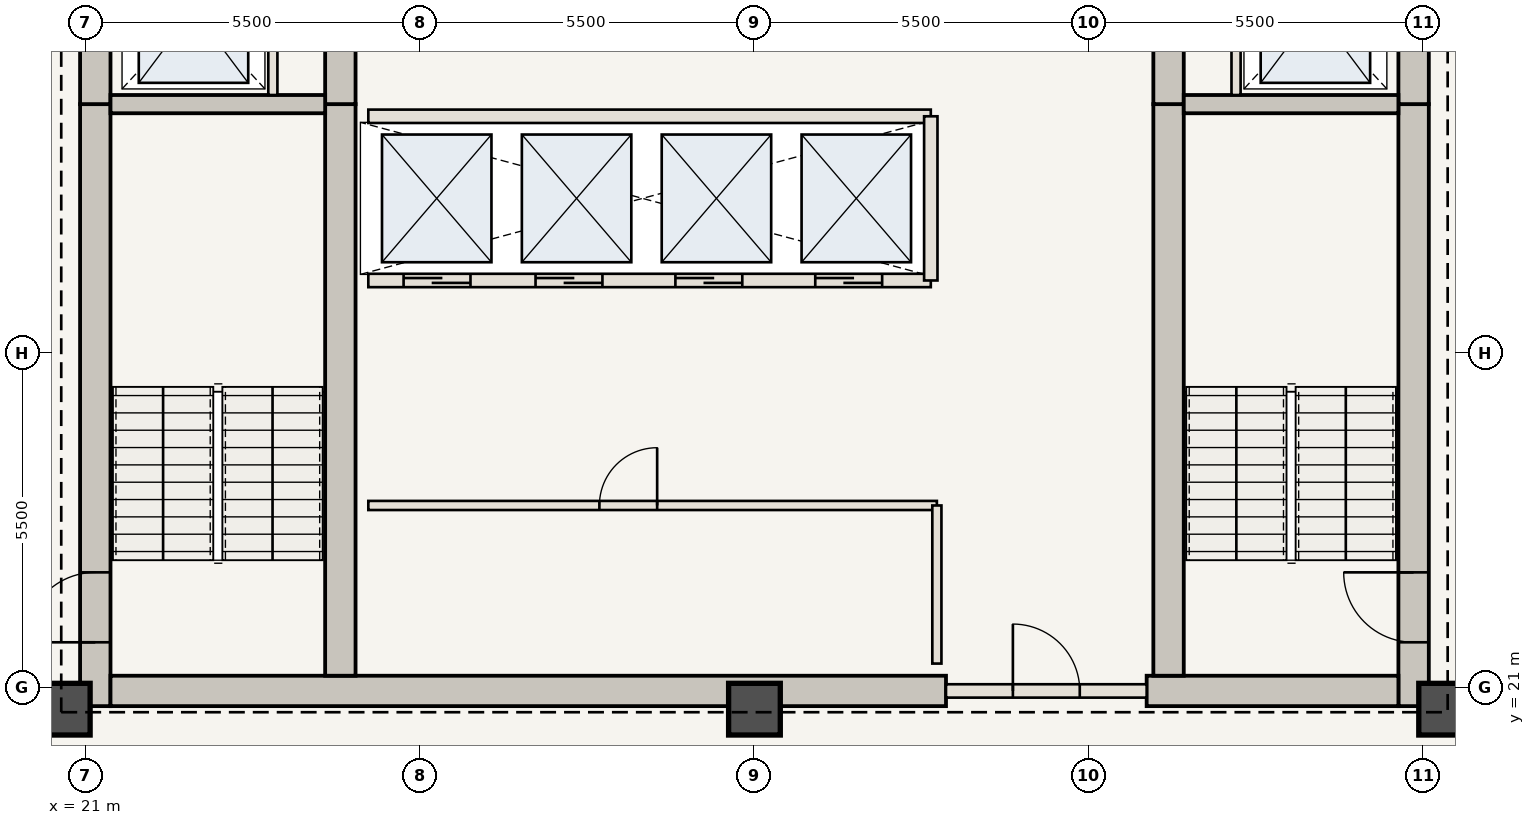
"""IFC4 building model, lengths in metres.
Left out: names, types, materials, properties, quantities, classifications, styles, units other than length and angle.
Written with IfcOpenShell. Run it as: python <this file> out.ifc"""

import sys

from ifc_helpers import new_model, si_unit, direction, frame, frame_2d, origin, origin_2d, place, context, subcontext, project, spatial, rectangle, extrude, element, fill, save


model = new_model("IFC4")
c1 = context("Model", 3, precision=1e-05, world=origin(), true_north=direction((0.0, 1.0)))
c2 = subcontext(c1, "Body", "Model", "MODEL_VIEW")
j1 = project(units=[si_unit("LENGTHUNIT", "METRE"), si_unit("PLANEANGLEUNIT", "RADIAN")], contexts=[c1])
p1 = place(None, origin())
s1 = spatial("IfcSite", under=j1, at=p1, CompositionType="ELEMENT")
p2 = place(p1, origin())
s2 = spatial("IfcBuilding", under=s1, at=p2, CompositionType="ELEMENT")
p3 = place(p2, frame((0.0, 0.0, 248.5)))
s3 = spatial("IfcBuildingStorey", under=s2, at=p3, CompositionType="ELEMENT", Elevation=248.5)
p4 = place(p3, frame((21.16, 20.7, 0.0), z_axis=(0.0, 0.0, 1.0), x_axis=(0.0, 1.0, 0.0)))
e1 = element("IfcWall", 1, at=p4, inside=s3, PredefinedType="SHEAR", context=c2, shape_type="SweptSolid", body=[
    extrude(rectangle(XDim=9.9, YDim=0.5, at=frame_2d((4.95, 0.0))), origin(), (0.0, 0.0, 1.0), 3.85),
])
p5 = place(p4, frame((1.05, 0.0, 0.0)))
e2 = element("IfcOpeningElement", 2, at=p5, cuts=e1, PredefinedType="OPENING", context=c2, shape_type="SweptSolid", body=[
    extrude(rectangle(XDim=1.15, YDim=2.15, at=frame_2d((0.575, 1.075))), frame((0.0, 0.26, 0.0), z_axis=(0.0, -1.0, 0.0), x_axis=(1.0, 0.0, 0.0)), (0.0, 0.0, 1.0), 0.52),
])
p6 = place(p3, frame((21.16, 30.6, 0.0), z_axis=(0.0, 0.0, 1.0), x_axis=(0.0, 1.0, 0.0)))
e3 = element("IfcWall", 3, at=p6, inside=s3, PredefinedType="SHEAR", context=c2, shape_type="SweptSolid", body=[
    extrude(rectangle(XDim=12.65, YDim=0.5, at=frame_2d((6.325, 0.0))), origin(), (0.0, 0.0, 1.0), 3.85),
])
p7 = place(p6, frame((4.2, 0.0, 0.0)))
e4 = element("IfcOpeningElement", 4, at=p7, cuts=e3, PredefinedType="OPENING", context=c2, shape_type="SweptSolid", body=[
    extrude(rectangle(XDim=1.1, YDim=2.15, at=frame_2d((0.55, 1.075))), frame((0.0, 0.26, 0.0), z_axis=(0.0, -1.0, 0.0), x_axis=(1.0, 0.0, 0.0)), (0.0, 0.0, 1.0), 0.52),
])
p8 = place(p6, frame((9.2, 0.0, 0.0)))
e5 = element("IfcOpeningElement", 5, at=p8, cuts=e3, PredefinedType="OPENING", context=c2, shape_type="SweptSolid", body=[
    extrude(rectangle(XDim=0.92, YDim=2.1, at=frame_2d((0.46, 1.05))), frame((0.0, 0.26, 0.0), z_axis=(0.0, -1.0, 0.0), x_axis=(1.0, 0.0, 0.0)), (0.0, 0.0, 1.0), 0.52),
])
p9 = place(p3, frame((42.84, 20.7, 0.0), z_axis=(0.0, 0.0, 1.0), x_axis=(0.0, 1.0, 0.0)))
e6 = element("IfcWall", 6, at=p9, inside=s3, PredefinedType="SHEAR", context=c2, shape_type="SweptSolid", body=[
    extrude(rectangle(XDim=9.9, YDim=0.5, at=frame_2d((4.95, 0.0))), origin(), (0.0, 0.0, 1.0), 3.85),
])
p10 = place(p9, frame((1.05, 0.0, 0.0)))
e7 = element("IfcOpeningElement", 7, at=p10, cuts=e6, PredefinedType="OPENING", context=c2, shape_type="SweptSolid", body=[
    extrude(rectangle(XDim=1.15, YDim=2.15, at=frame_2d((0.575, 1.075))), frame((0.0, 0.26, 0.0), z_axis=(0.0, -1.0, 0.0), x_axis=(1.0, 0.0, 0.0)), (0.0, 0.0, 1.0), 0.52),
])
p11 = place(p3, frame((42.84, 30.6, 0.0), z_axis=(0.0, 0.0, 1.0), x_axis=(0.0, 1.0, 0.0)))
e8 = element("IfcWall", 8, at=p11, inside=s3, PredefinedType="SHEAR", context=c2, shape_type="SweptSolid", body=[
    extrude(rectangle(XDim=12.65, YDim=0.5, at=frame_2d((6.325, 0.0))), origin(), (0.0, 0.0, 1.0), 3.85),
])
p12 = place(p11, frame((4.2, 0.0, 0.0)))
e9 = element("IfcOpeningElement", 9, at=p12, cuts=e8, PredefinedType="OPENING", context=c2, shape_type="SweptSolid", body=[
    extrude(rectangle(XDim=1.1, YDim=2.15, at=frame_2d((0.55, 1.075))), frame((0.0, 0.26, 0.0), z_axis=(0.0, -1.0, 0.0), x_axis=(1.0, 0.0, 0.0)), (0.0, 0.0, 1.0), 0.52),
])
p13 = place(p11, frame((8.05, 0.0, 0.0)))
e10 = element("IfcOpeningElement", 10, at=p13, cuts=e8, PredefinedType="OPENING", context=c2, shape_type="SweptSolid", body=[
    extrude(rectangle(XDim=0.88, YDim=2.1, at=frame_2d((0.44, 1.05))), frame((0.0, 0.26, 0.0), z_axis=(0.0, -1.0, 0.0), x_axis=(1.0, 0.0, 0.0)), (0.0, 0.0, 1.0), 0.52),
])
p14 = place(p11, frame((9.45, 0.0, 0.0)))
e11 = element("IfcOpeningElement", 11, at=p14, cuts=e8, PredefinedType="OPENING", context=c2, shape_type="SweptSolid", body=[
    extrude(rectangle(XDim=0.88, YDim=2.1, at=frame_2d((0.44, 1.05))), frame((0.0, 0.26, 0.0), z_axis=(0.0, -1.0, 0.0), x_axis=(1.0, 0.0, 0.0)), (0.0, 0.0, 1.0), 0.52),
])
p15 = place(p11, frame((10.85, 0.0, 0.0)))
e12 = element("IfcOpeningElement", 12, at=p15, cuts=e8, PredefinedType="OPENING", context=c2, shape_type="SweptSolid", body=[
    extrude(rectangle(XDim=0.88, YDim=2.1, at=frame_2d((0.44, 1.05))), frame((0.0, 0.26, 0.0), z_axis=(0.0, -1.0, 0.0), x_axis=(1.0, 0.0, 0.0)), (0.0, 0.0, 1.0), 0.52),
])
p16 = place(p3, frame((21.41, 20.95, 0.0), z_axis=(0.0, 0.0, 1.0), x_axis=(1.0, 0.0, 0.0)))
e13 = element("IfcWall", 13, at=p16, inside=s3, PredefinedType="SHEAR", context=c2, shape_type="SweptSolid", body=[
    extrude(rectangle(XDim=13.74, YDim=0.5, at=frame_2d((6.87, 0.0))), origin(), (0.0, 0.0, 1.0), 3.85),
])
p17 = place(p3, frame((38.45, 20.95, 0.0), z_axis=(0.0, 0.0, 1.0), x_axis=(1.0, 0.0, 0.0)))
e14 = element("IfcWall", 14, at=p17, inside=s3, PredefinedType="SHEAR", context=c2, shape_type="SweptSolid", body=[
    extrude(rectangle(XDim=4.14, YDim=0.5, at=frame_2d((2.07, 0.0))), origin(), (0.0, 0.0, 1.0), 3.85),
])
p18 = place(p3, frame((25.19, 21.2, 0.0), z_axis=(0.0, 0.0, 1.0), x_axis=(0.0, 1.0, 0.0)))
e15 = element("IfcWall", 15, at=p18, inside=s3, PredefinedType="SHEAR", context=c2, shape_type="SweptSolid", body=[
    extrude(rectangle(XDim=9.4, YDim=0.5, at=frame_2d((4.7, 0.0))), origin(), (0.0, 0.0, 1.0), 3.85),
])
p19 = place(p3, frame((25.19, 30.6, 0.0), z_axis=(0.0, 0.0, 1.0), x_axis=(0.0, 1.0, 0.0)))
e16 = element("IfcWall", 16, at=p19, inside=s3, PredefinedType="SHEAR", context=c2, shape_type="SweptSolid", body=[
    extrude(rectangle(XDim=12.15, YDim=0.5, at=frame_2d((6.075, 0.0))), origin(), (0.0, 0.0, 1.0), 3.85),
])
p20 = place(p19, frame((6.25, 0.0, 0.0)))
e17 = element("IfcOpeningElement", 17, at=p20, cuts=e16, PredefinedType="OPENING", context=c2, shape_type="SweptSolid", body=[
    extrude(rectangle(XDim=1.1, YDim=2.15, at=frame_2d((0.55, 1.075))), frame((0.0, 0.26, 0.0), z_axis=(0.0, -1.0, 0.0), x_axis=(1.0, 0.0, 0.0)), (0.0, 0.0, 1.0), 0.52),
])
p21 = place(p3, frame((38.81, 21.2, 0.0), z_axis=(0.0, 0.0, 1.0), x_axis=(0.0, 1.0, 0.0)))
e18 = element("IfcWall", 18, at=p21, inside=s3, PredefinedType="SHEAR", context=c2, shape_type="SweptSolid", body=[
    extrude(rectangle(XDim=9.4, YDim=0.5, at=frame_2d((4.7, 0.0))), origin(), (0.0, 0.0, 1.0), 3.85),
])
p22 = place(p3, frame((38.81, 30.6, 0.0), z_axis=(0.0, 0.0, 1.0), x_axis=(0.0, 1.0, 0.0)))
e19 = element("IfcWall", 19, at=p22, inside=s3, PredefinedType="SHEAR", context=c2, shape_type="SweptSolid", body=[
    extrude(rectangle(XDim=12.15, YDim=0.5, at=frame_2d((6.075, 0.0))), origin(), (0.0, 0.0, 1.0), 3.85),
])
for number, where, z_axis, x_axis in (
    (20, (20.65, 20.65, 0.0), (0.0, 0.0, 1.0), (1.0, 0.0, 0.0)),
    (21, (32.0, 20.65, 0.0), (0.0, 0.0, 1.0), (1.0, 0.0, 0.0)),
    (22, (43.35, 20.65, 0.0), (0.0, 0.0, 1.0), (1.0, 0.0, 0.0)),
):
    element("IfcColumn", number, at=place(p3, frame(where, z_axis=z_axis, x_axis=x_axis)), inside=s3, PredefinedType="COLUMN", context=c2, shape_type="SweptSolid", body=[
        extrude(rectangle(XDim=0.85, YDim=0.85, at=origin_2d()), origin(), (0.0, 0.0, 1.0), 3.85),
    ])
for number, where, z_axis, x_axis in (
    (23, (21.41, 30.6, 0.0), (0.0, 0.0, 1.0), (1.0, 0.0, 0.0)),
    (24, (39.06, 30.6, 0.0), (0.0, 0.0, 1.0), (1.0, 0.0, 0.0)),
):
    element("IfcWall", number, at=place(p3, frame(where, z_axis=z_axis, x_axis=x_axis)), inside=s3, PredefinedType="SHEAR", context=c2, shape_type="SweptSolid", body=[
        extrude(rectangle(XDim=3.53, YDim=0.3, at=frame_2d((1.765, 0.0))), origin(), (0.0, 0.0, 1.0), 3.43),
    ])
for number, where, z_axis, x_axis in (
    (25, (24.08, 30.75, 0.0), (0.0, 0.0, 1.0), (0.0, 1.0, 0.0)),
    (26, (39.92, 30.75, 0.0), (0.0, 0.0, 1.0), (0.0, 1.0, 0.0)),
):
    element("IfcWall", number, at=place(p3, frame(where, z_axis=z_axis, x_axis=x_axis)), inside=s3, PredefinedType="STANDARD", context=c2, shape_type="SweptSolid", body=[
        extrude(rectangle(XDim=2.65, YDim=0.15, at=frame_2d((1.325, 0.0))), origin(), (0.0, 0.0, 1.0), 3.43),
    ])
p23 = place(p3, frame((35.15, 20.95, 0.0), z_axis=(0.0, 0.0, 1.0), x_axis=(1.0, 0.0, 0.0)))
e27 = element("IfcWall", 27, at=p23, inside=s3, PredefinedType="STANDARD", context=c2, shape_type="SweptSolid", body=[
    extrude(rectangle(XDim=3.3, YDim=0.22, at=frame_2d((1.65, 0.0))), origin(), (0.0, 0.0, 1.0), 3.43),
])
p24 = place(p23, frame((1.1, 0.0, 0.0)))
e28 = element("IfcOpeningElement", 28, at=p24, cuts=e27, PredefinedType="OPENING", context=c2, shape_type="SweptSolid", body=[
    extrude(rectangle(XDim=1.1, YDim=2.15, at=frame_2d((0.55, 1.075))), frame((0.0, 0.12, 0.0), z_axis=(0.0, -1.0, 0.0), x_axis=(1.0, 0.0, 0.0)), (0.0, 0.0, 1.0), 0.24),
])
p25 = place(p3, frame((25.65, 24.0, 0.0), z_axis=(0.0, 0.0, 1.0), x_axis=(1.0, 0.0, 0.0)))
e29 = element("IfcWall", 29, at=p25, inside=s3, PredefinedType="STANDARD", context=c2, shape_type="SweptSolid", body=[
    extrude(rectangle(XDim=9.35, YDim=0.15, at=frame_2d((4.675, 0.0))), origin(), (0.0, 0.0, 1.0), 3.43),
])
p26 = place(p25, frame((3.8, 0.0, 0.0)))
e30 = element("IfcOpeningElement", 30, at=p26, cuts=e29, PredefinedType="OPENING", context=c2, shape_type="SweptSolid", body=[
    extrude(rectangle(XDim=0.95, YDim=2.15, at=frame_2d((0.475, 1.075))), frame((0.0, 0.085, 0.0), z_axis=(0.0, -1.0, 0.0), x_axis=(1.0, 0.0, 0.0)), (0.0, 0.0, 1.0), 0.17),
])
p27 = place(p3, frame((35.0, 21.4, 0.0), z_axis=(0.0, 0.0, 1.0), x_axis=(0.0, 1.0, 0.0)))
e31 = element("IfcWall", 31, at=p27, inside=s3, PredefinedType="STANDARD", context=c2, shape_type="SweptSolid", body=[
    extrude(rectangle(XDim=2.6, YDim=0.15, at=frame_2d((1.3, 0.0))), origin(), (0.0, 0.0, 1.0), 3.43),
])
p28 = place(p3, frame((25.65, 27.7, 0.0), z_axis=(0.0, 0.0, 1.0), x_axis=(1.0, 0.0, 0.0)))
e32 = element("IfcWall", 32, at=p28, inside=s3, PredefinedType="STANDARD", context=c2, shape_type="SweptSolid", body=[
    extrude(rectangle(XDim=9.25, YDim=0.22, at=frame_2d((4.625, 0.0))), origin(), (0.0, 0.0, 1.0), 3.43),
])
p29 = place(p28, frame((0.58, 0.0, 0.0)))
e33 = element("IfcOpeningElement", 33, at=p29, cuts=e32, PredefinedType="OPENING", context=c2, shape_type="SweptSolid", body=[
    extrude(rectangle(XDim=1.1, YDim=2.15, at=frame_2d((0.55, 1.075))), frame((0.0, 0.12, 0.0), z_axis=(0.0, -1.0, 0.0), x_axis=(1.0, 0.0, 0.0)), (0.0, 0.0, 1.0), 0.24),
])
p30 = place(p28, frame((2.75, 0.0, 0.0)))
e34 = element("IfcOpeningElement", 34, at=p30, cuts=e32, PredefinedType="OPENING", context=c2, shape_type="SweptSolid", body=[
    extrude(rectangle(XDim=1.1, YDim=2.15, at=frame_2d((0.55, 1.075))), frame((0.0, 0.12, 0.0), z_axis=(0.0, -1.0, 0.0), x_axis=(1.0, 0.0, 0.0)), (0.0, 0.0, 1.0), 0.24),
])
p31 = place(p28, frame((5.05, 0.0, 0.0)))
e35 = element("IfcOpeningElement", 35, at=p31, cuts=e32, PredefinedType="OPENING", context=c2, shape_type="SweptSolid", body=[
    extrude(rectangle(XDim=1.1, YDim=2.15, at=frame_2d((0.55, 1.075))), frame((0.0, 0.12, 0.0), z_axis=(0.0, -1.0, 0.0), x_axis=(1.0, 0.0, 0.0)), (0.0, 0.0, 1.0), 0.24),
])
p32 = place(p28, frame((7.35, 0.0, 0.0)))
e36 = element("IfcOpeningElement", 36, at=p32, cuts=e32, PredefinedType="OPENING", context=c2, shape_type="SweptSolid", body=[
    extrude(rectangle(XDim=1.1, YDim=2.15, at=frame_2d((0.55, 1.075))), frame((0.0, 0.12, 0.0), z_axis=(0.0, -1.0, 0.0), x_axis=(1.0, 0.0, 0.0)), (0.0, 0.0, 1.0), 0.24),
])
p33 = place(p3, frame((25.65, 30.4, 0.0), z_axis=(0.0, 0.0, 1.0), x_axis=(1.0, 0.0, 0.0)))
e37 = element("IfcWall", 37, at=p33, inside=s3, PredefinedType="STANDARD", context=c2, shape_type="SweptSolid", body=[
    extrude(rectangle(XDim=9.25, YDim=0.22, at=frame_2d((4.625, 0.0))), origin(), (0.0, 0.0, 1.0), 3.43),
])
p34 = place(p3, frame((34.9, 27.7, 0.0), z_axis=(0.0, 0.0, 1.0), x_axis=(0.0, 1.0, 0.0)))
e38 = element("IfcWall", 38, at=p34, inside=s3, PredefinedType="STANDARD", context=c2, shape_type="SweptSolid", body=[
    extrude(rectangle(XDim=2.7, YDim=0.22, at=frame_2d((1.35, 0.0))), origin(), (0.0, 0.0, 1.0), 3.43),
])
p35 = place(p5, origin())
e39 = element("IfcDoor", 39, at=p35, inside=s3, OperationType="SINGLE_SWING_LEFT", PredefinedType="DOOR", context=c2, shape_type="SweptSolid", body=[
    extrude(rectangle(XDim=1.15, YDim=2.15, at=frame_2d((0.575, 1.075))), frame((0.0, 0.025, 0.0), z_axis=(0.0, -1.0, 0.0), x_axis=(1.0, 0.0, 0.0)), (0.0, 0.0, 1.0), 0.05),
])
fill(e2, e39)
p36 = place(p10, origin())
e40 = element("IfcDoor", 40, at=p36, inside=s3, OperationType="SINGLE_SWING_RIGHT", PredefinedType="DOOR", context=c2, shape_type="SweptSolid", body=[
    extrude(rectangle(XDim=1.15, YDim=2.15, at=frame_2d((0.575, 1.075))), frame((0.0, 0.025, 0.0), z_axis=(0.0, -1.0, 0.0), x_axis=(1.0, 0.0, 0.0)), (0.0, 0.0, 1.0), 0.05),
])
fill(e7, e40)
p37 = place(p24, origin())
e41 = element("IfcDoor", 41, at=p37, inside=s3, OperationType="SINGLE_SWING_LEFT", PredefinedType="DOOR", context=c2, shape_type="SweptSolid", body=[
    extrude(rectangle(XDim=1.1, YDim=2.15, at=frame_2d((0.55, 1.075))), frame((0.0, 0.025, 0.0), z_axis=(0.0, -1.0, 0.0), x_axis=(1.0, 0.0, 0.0)), (0.0, 0.0, 1.0), 0.05),
])
fill(e28, e41)
p38 = place(p26, origin())
e42 = element("IfcDoor", 42, at=p38, inside=s3, OperationType="SINGLE_SWING_RIGHT", PredefinedType="DOOR", context=c2, shape_type="SweptSolid", body=[
    extrude(rectangle(XDim=0.95, YDim=2.15, at=frame_2d((0.475, 1.075))), frame((0.0, 0.025, 0.0), z_axis=(0.0, -1.0, 0.0), x_axis=(1.0, 0.0, 0.0)), (0.0, 0.0, 1.0), 0.05),
])
fill(e30, e42)
p39 = place(p29, origin())
e43 = element("IfcDoor", 43, at=p39, inside=s3, OperationType="DOUBLE_DOOR_SLIDING", PredefinedType="DOOR", context=c2, shape_type="SweptSolid", body=[
    extrude(rectangle(XDim=1.1, YDim=2.15, at=frame_2d((0.55, 1.075))), frame((0.0, 0.025, 0.0), z_axis=(0.0, -1.0, 0.0), x_axis=(1.0, 0.0, 0.0)), (0.0, 0.0, 1.0), 0.05),
])
fill(e33, e43)
p40 = place(p30, origin())
e44 = element("IfcDoor", 44, at=p40, inside=s3, OperationType="DOUBLE_DOOR_SLIDING", PredefinedType="DOOR", context=c2, shape_type="SweptSolid", body=[
    extrude(rectangle(XDim=1.1, YDim=2.15, at=frame_2d((0.55, 1.075))), frame((0.0, 0.025, 0.0), z_axis=(0.0, -1.0, 0.0), x_axis=(1.0, 0.0, 0.0)), (0.0, 0.0, 1.0), 0.05),
])
fill(e34, e44)
p41 = place(p31, origin())
e45 = element("IfcDoor", 45, at=p41, inside=s3, OperationType="DOUBLE_DOOR_SLIDING", PredefinedType="DOOR", context=c2, shape_type="SweptSolid", body=[
    extrude(rectangle(XDim=1.1, YDim=2.15, at=frame_2d((0.55, 1.075))), frame((0.0, 0.025, 0.0), z_axis=(0.0, -1.0, 0.0), x_axis=(1.0, 0.0, 0.0)), (0.0, 0.0, 1.0), 0.05),
])
fill(e35, e45)
p42 = place(p32, origin())
e46 = element("IfcDoor", 46, at=p42, inside=s3, OperationType="DOUBLE_DOOR_SLIDING", PredefinedType="DOOR", context=c2, shape_type="SweptSolid", body=[
    extrude(rectangle(XDim=1.1, YDim=2.15, at=frame_2d((0.55, 1.075))), frame((0.0, 0.025, 0.0), z_axis=(0.0, -1.0, 0.0), x_axis=(1.0, 0.0, 0.0)), (0.0, 0.0, 1.0), 0.05),
])
fill(e36, e46)
save(model, sys.argv[1])
